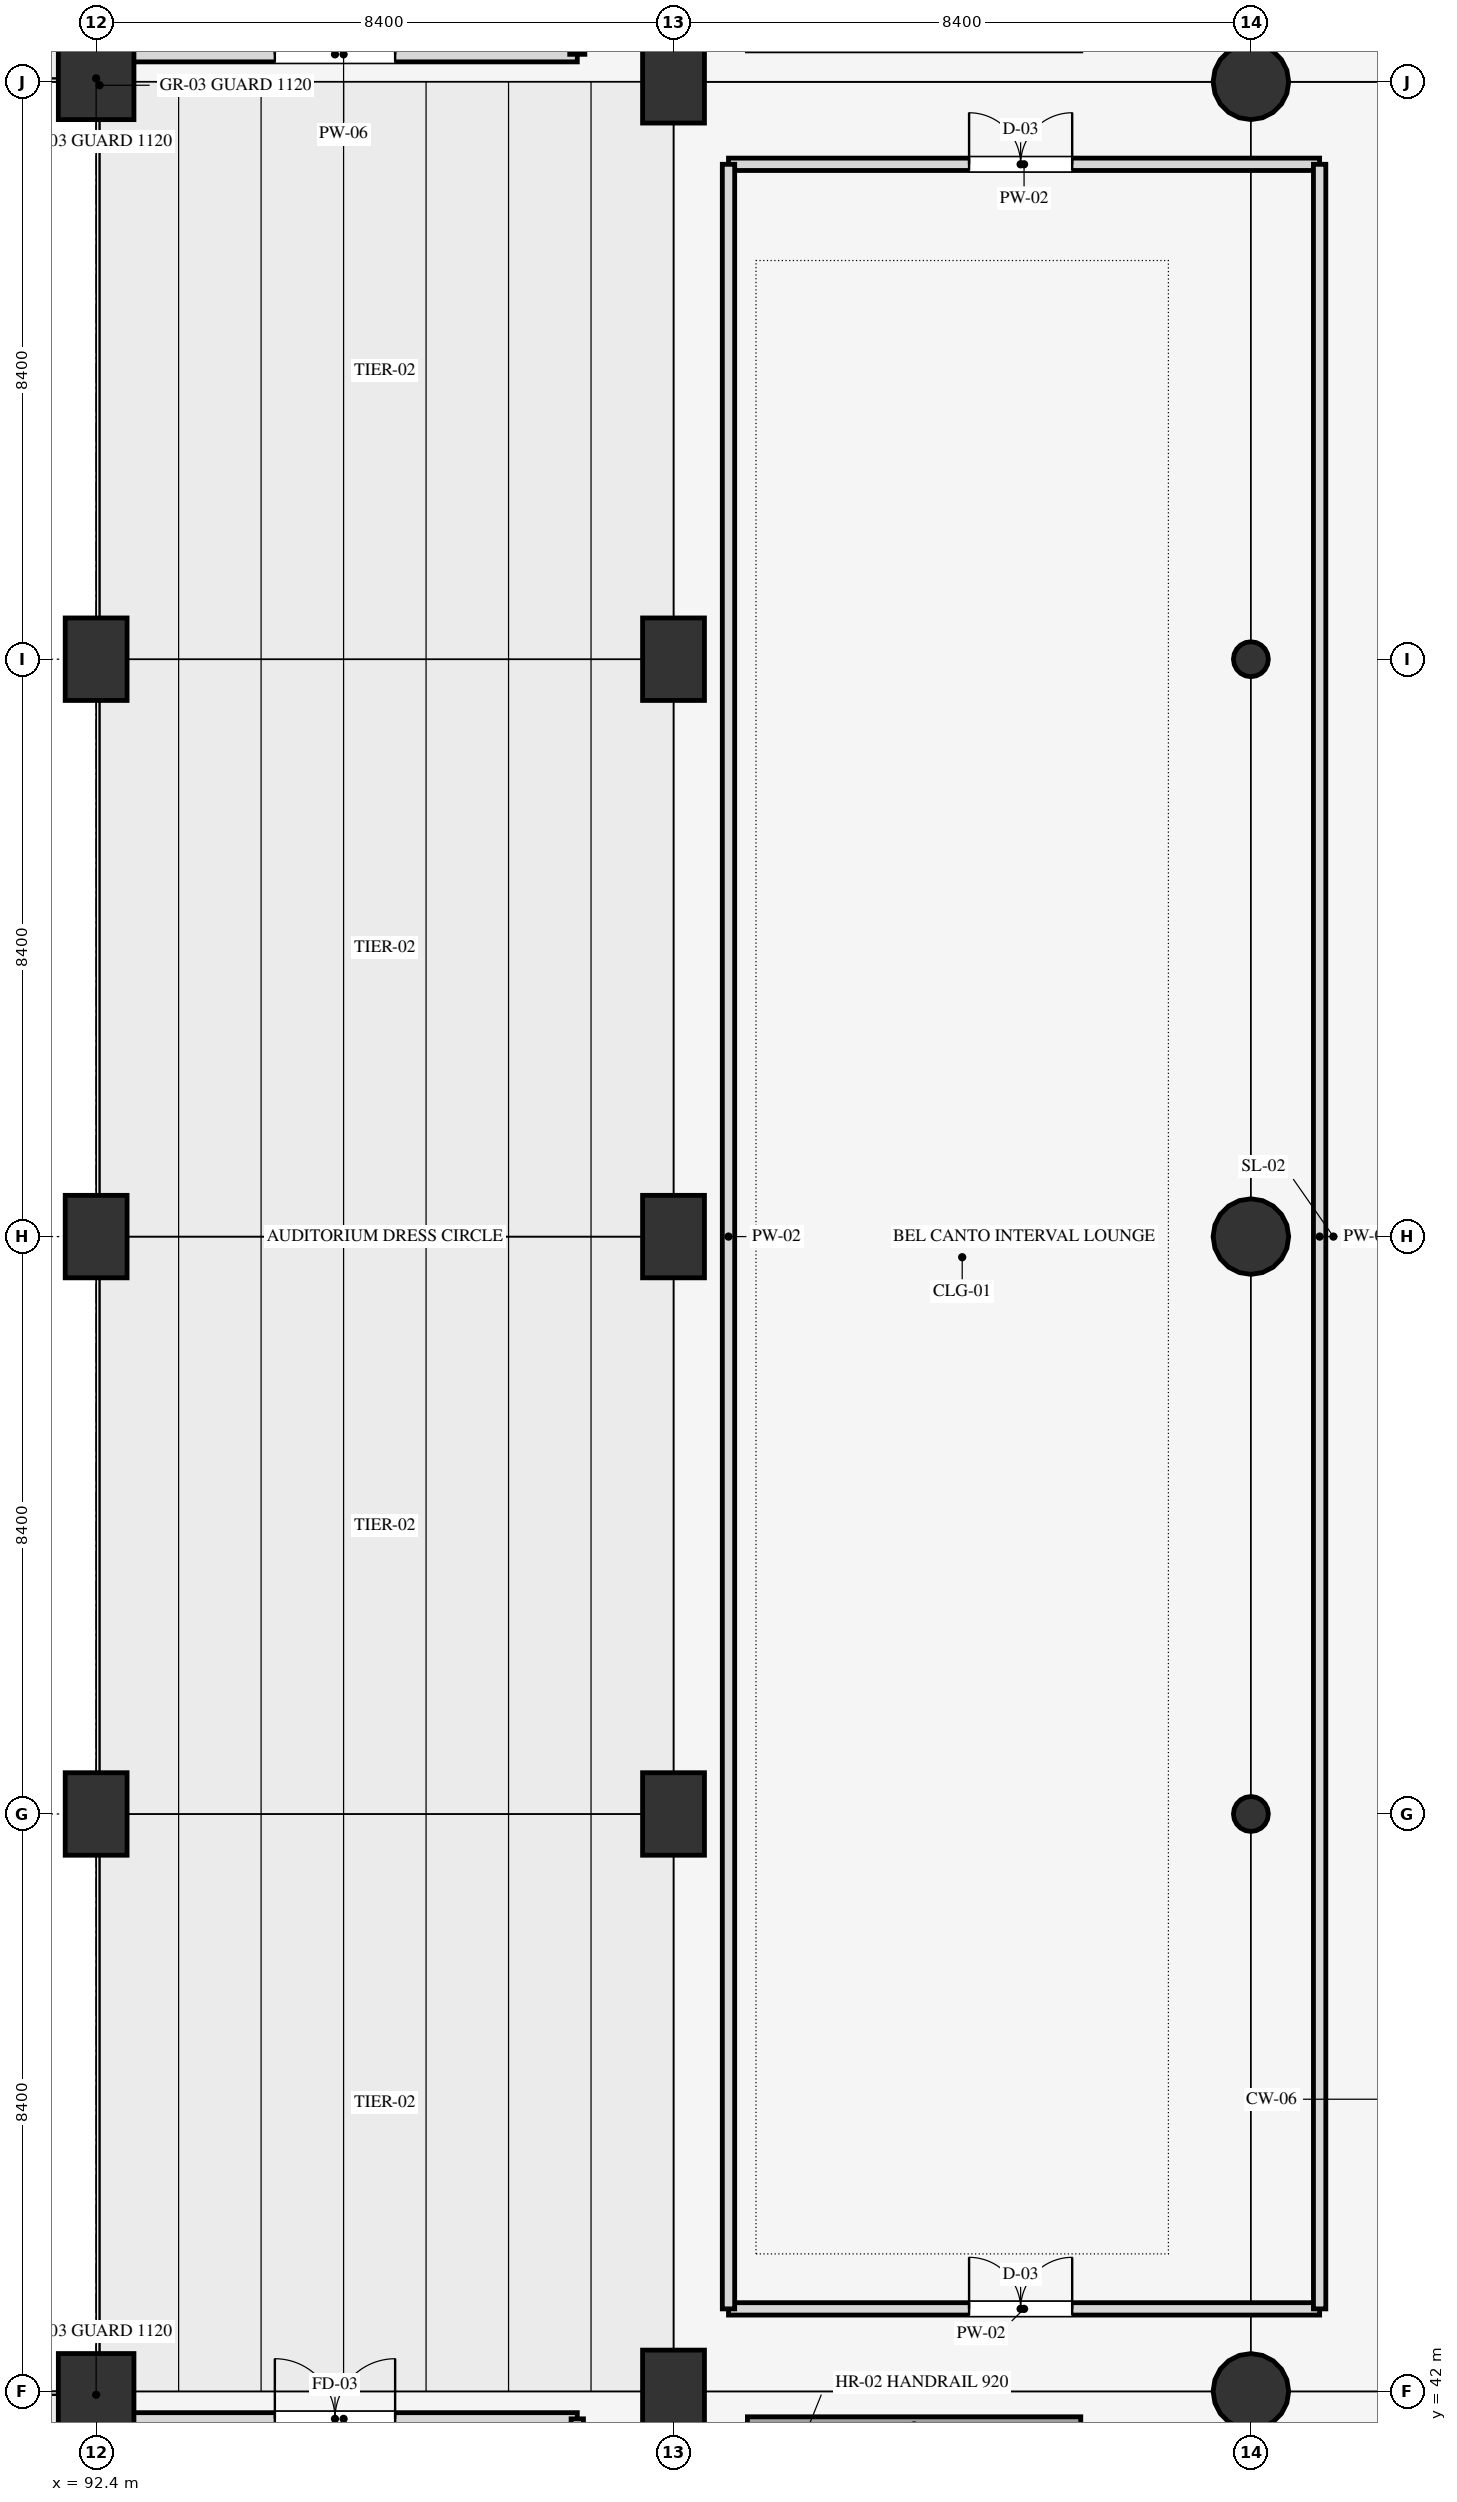
"""IFC4 building model, lengths in metres.
Left out: names, types, materials, properties, quantities, classifications, styles, units other than length and angle.
Written with IfcOpenShell. Run it as: python <this file> out.ifc"""

import sys

from ifc_helpers import new_model, si_unit, direction, frame, frame_2d, origin, origin_2d, place, context, subcontext, project, spatial, rectangle, circle, hollow_circle, extrude, element, fill, save


model = new_model("IFC4")
c1 = context("Model", 3, precision=1e-05, world=origin(), true_north=direction((0.0, 1.0)))
c2 = subcontext(c1, "Body", "Model", "MODEL_VIEW")
j1 = project(units=[si_unit("LENGTHUNIT", "METRE"), si_unit("PLANEANGLEUNIT", "RADIAN")], contexts=[c1])
p1 = place(None, origin())
s1 = spatial("IfcSite", under=j1, at=p1, CompositionType="ELEMENT")
p2 = place(p1, origin())
s2 = spatial("IfcBuilding", under=s1, at=p2, CompositionType="ELEMENT")
p3 = place(p2, frame((0.0, 0.0, 9.9)))
s3 = spatial("IfcBuildingStorey", under=s2, at=p3, CompositionType="ELEMENT", Elevation=9.9)
p4 = place(p3, frame((92.4, 42.0, 0.0), z_axis=(0.0, 0.0, 1.0), x_axis=(1.0, 0.0, 0.0)))
e1 = element("IfcColumn", 1, at=p4, inside=s3, PredefinedType="COLUMN", context=c2, shape_type="SweptSolid", body=[
    extrude(rectangle(XDim=1.1, YDim=1.1, at=origin_2d()), origin(), (0.0, 0.0, 1.0), 4.5),
])
for number, where, z_axis, x_axis in (
    (2, (92.4, 50.4, 0.0), (0.0, 0.0, 1.0), (1.0, 0.0, 0.0)),
    (3, (92.4, 58.8, 0.0), (0.0, 0.0, 1.0), (1.0, 0.0, 0.0)),
    (4, (92.4, 67.2, 0.0), (0.0, 0.0, 1.0), (1.0, 0.0, 0.0)),
):
    element("IfcColumn", number, at=place(p3, frame(where, z_axis=z_axis, x_axis=x_axis)), inside=s3, PredefinedType="COLUMN", context=c2, shape_type="SweptSolid", body=[
        extrude(rectangle(XDim=0.9, YDim=1.2, at=origin_2d()), origin(), (0.0, 0.0, 1.0), 4.5),
    ])
p5 = place(p3, frame((92.4, 75.6, 0.0), z_axis=(0.0, 0.0, 1.0), x_axis=(1.0, 0.0, 0.0)))
e5 = element("IfcColumn", 5, at=p5, inside=s3, PredefinedType="COLUMN", context=c2, shape_type="SweptSolid", body=[
    extrude(rectangle(XDim=1.1, YDim=1.1, at=origin_2d()), origin(), (0.0, 0.0, 1.0), 4.5),
])
for number, where, z_axis, x_axis in (
    (6, (100.8, 42.0, 0.0), (0.0, 0.0, 1.0), (1.0, 0.0, 0.0)),
    (7, (100.8, 50.4, 0.0), (0.0, 0.0, 1.0), (1.0, 0.0, 0.0)),
    (8, (100.8, 58.8, 0.0), (0.0, 0.0, 1.0), (1.0, 0.0, 0.0)),
    (9, (100.8, 67.2, 0.0), (0.0, 0.0, 1.0), (1.0, 0.0, 0.0)),
    (10, (100.8, 75.6, 0.0), (0.0, 0.0, 1.0), (1.0, 0.0, 0.0)),
):
    element("IfcColumn", number, at=place(p3, frame(where, z_axis=z_axis, x_axis=x_axis)), inside=s3, PredefinedType="COLUMN", context=c2, shape_type="SweptSolid", body=[
        extrude(rectangle(XDim=0.9, YDim=1.2, at=origin_2d()), origin(), (0.0, 0.0, 1.0), 4.5),
    ])
p6 = place(p3, frame((109.2, 42.0, 0.0), z_axis=(0.0, 0.0, 1.0), x_axis=(1.0, 0.0, 0.0)))
e11 = element("IfcColumn", 11, at=p6, inside=s3, PredefinedType="COLUMN", context=c2, shape_type="SweptSolid", body=[
    extrude(circle(Radius=0.55, at=origin_2d()), origin(), (0.0, 0.0, 1.0), 4.5),
])
p7 = place(p3, frame((109.2, 50.4, 0.0), z_axis=(0.0, 0.0, 1.0), x_axis=(1.0, 0.0, 0.0)))
e12 = element("IfcColumn", 12, at=p7, inside=s3, PredefinedType="COLUMN", context=c2, shape_type="SweptSolid", body=[
    extrude(hollow_circle(Radius=0.254, WallThickness=0.02, at=origin_2d()), origin(), (0.0, 0.0, 1.0), 4.5),
])
p8 = place(p3, frame((109.2, 58.8, 0.0), z_axis=(0.0, 0.0, 1.0), x_axis=(1.0, 0.0, 0.0)))
e13 = element("IfcColumn", 13, at=p8, inside=s3, PredefinedType="COLUMN", context=c2, shape_type="SweptSolid", body=[
    extrude(circle(Radius=0.55, at=origin_2d()), origin(), (0.0, 0.0, 1.0), 4.5),
])
p9 = place(p3, frame((109.2, 67.2, 0.0), z_axis=(0.0, 0.0, 1.0), x_axis=(1.0, 0.0, 0.0)))
e14 = element("IfcColumn", 14, at=p9, inside=s3, PredefinedType="COLUMN", context=c2, shape_type="SweptSolid", body=[
    extrude(hollow_circle(Radius=0.254, WallThickness=0.02, at=origin_2d()), origin(), (0.0, 0.0, 1.0), 4.5),
])
p10 = place(p3, frame((109.2, 75.6, 0.0), z_axis=(0.0, 0.0, 1.0), x_axis=(1.0, 0.0, 0.0)))
e15 = element("IfcColumn", 15, at=p10, inside=s3, PredefinedType="COLUMN", context=c2, shape_type="SweptSolid", body=[
    extrude(circle(Radius=0.55, at=origin_2d()), origin(), (0.0, 0.0, 1.0), 4.5),
])
p11 = place(p3, frame((101.875, 41.505, 0.0), z_axis=(0.0, 0.0, 1.0), x_axis=(1.0, 0.0, 0.0)))
e16 = element("IfcWall", 16, at=p11, inside=s3, PredefinedType="SHEAR", context=c2, shape_type="SweptSolid", body=[
    extrude(rectangle(XDim=4.85, YDim=0.25, at=frame_2d((2.425, 0.0))), origin(), (0.0, 0.0, 1.0), 4.5),
])
p12 = place(p3, frame((92.6, 41.6, 0.0), z_axis=(0.0, 0.0, 1.0), x_axis=(1.0, 0.0, 0.0)))
e17 = element("IfcWall", 17, at=p12, inside=s3, PredefinedType="PARTITIONING", context=c2, shape_type="SweptSolid", body=[
    extrude(rectangle(XDim=6.8, YDim=0.18, at=frame_2d((3.4, 0.0))), origin(), (0.0, 0.0, 1.0), 3.54),
])
p13 = place(p12, frame((2.4, 0.0, 0.0)))
e18 = element("IfcOpeningElement", 18, at=p13, cuts=e17, PredefinedType="OPENING", context=c2, shape_type="SweptSolid", body=[
    extrude(rectangle(XDim=1.75, YDim=2.2, at=frame_2d((0.875, 1.1))), frame((0.0, 0.1, 0.0), z_axis=(0.0, -1.0, 0.0), x_axis=(1.0, 0.0, 0.0)), (0.0, 0.0, 1.0), 0.2),
])
p14 = place(p3, frame((92.6, 34.2, 0.0), z_axis=(0.0, 0.0, 1.0), x_axis=(0.0, 1.0, 0.0)))
e19 = element("IfcWall", 19, at=p14, inside=s3, PredefinedType="PARTITIONING", context=c2, shape_type="SweptSolid", body=[
    extrude(rectangle(XDim=7.4, YDim=0.18, at=frame_2d((3.7, 0.0))), origin(), (0.0, 0.0, 1.0), 3.54),
])
p15 = place(p3, frame((99.4, 34.2, 0.0), z_axis=(0.0, 0.0, 1.0), x_axis=(0.0, 1.0, 0.0)))
e20 = element("IfcWall", 20, at=p15, inside=s3, PredefinedType="PARTITIONING", context=c2, shape_type="SweptSolid", body=[
    extrude(rectangle(XDim=7.4, YDim=0.18, at=frame_2d((3.7, 0.0))), origin(), (0.0, 0.0, 1.0), 3.54),
])
p16 = place(p15, frame((2.8, 0.0, 0.0)))
e21 = element("IfcOpeningElement", 21, at=p16, cuts=e20, PredefinedType="OPENING", context=c2, shape_type="SweptSolid", body=[
    extrude(rectangle(XDim=1.5, YDim=2.2, at=frame_2d((0.75, 1.1))), frame((0.0, 0.1, 0.0), z_axis=(0.0, -1.0, 0.0), x_axis=(1.0, 0.0, 0.0)), (0.0, 0.0, 1.0), 0.2),
])
p17 = place(p3, frame((92.6, 76.0, 0.0), z_axis=(0.0, 0.0, 1.0), x_axis=(1.0, 0.0, 0.0)))
e22 = element("IfcWall", 22, at=p17, inside=s3, PredefinedType="PARTITIONING", context=c2, shape_type="SweptSolid", body=[
    extrude(rectangle(XDim=6.8, YDim=0.22, at=frame_2d((3.4, 0.0))), origin(), (0.0, 0.0, 1.0), 3.54),
])
p18 = place(p17, frame((2.4, 0.0, 0.0)))
e23 = element("IfcOpeningElement", 23, at=p18, cuts=e22, PredefinedType="OPENING", context=c2, shape_type="SweptSolid", body=[
    extrude(rectangle(XDim=1.75, YDim=2.2, at=frame_2d((0.875, 1.1))), frame((0.0, 0.12, 0.0), z_axis=(0.0, -1.0, 0.0), x_axis=(1.0, 0.0, 0.0)), (0.0, 0.0, 1.0), 0.24),
])
p19 = place(p3, frame((92.6, 76.0, 0.0), z_axis=(0.0, 0.0, 1.0), x_axis=(0.0, 1.0, 0.0)))
e24 = element("IfcWall", 24, at=p19, inside=s3, PredefinedType="PARTITIONING", context=c2, shape_type="SweptSolid", body=[
    extrude(rectangle(XDim=7.4, YDim=0.22, at=frame_2d((3.7, 0.0))), origin(), (0.0, 0.0, 1.0), 3.54),
])
p20 = place(p3, frame((99.4, 76.0, 0.0), z_axis=(0.0, 0.0, 1.0), x_axis=(0.0, 1.0, 0.0)))
e25 = element("IfcWall", 25, at=p20, inside=s3, PredefinedType="PARTITIONING", context=c2, shape_type="SweptSolid", body=[
    extrude(rectangle(XDim=7.4, YDim=0.22, at=frame_2d((3.7, 0.0))), origin(), (0.0, 0.0, 1.0), 3.54),
])
p21 = place(p20, frame((2.8, 0.0, 0.0)))
e26 = element("IfcOpeningElement", 26, at=p21, cuts=e25, PredefinedType="OPENING", context=c2, shape_type="SweptSolid", body=[
    extrude(rectangle(XDim=1.32, YDim=2.18, at=frame_2d((0.66, 1.09))), frame((0.0, 0.12, 0.0), z_axis=(0.0, -1.0, 0.0), x_axis=(1.0, 0.0, 0.0)), (0.0, 0.0, 1.0), 0.24),
])
p22 = place(p3, frame((101.6, 43.2, 0.0), z_axis=(0.0, 0.0, 1.0), x_axis=(1.0, 0.0, 0.0)))
e27 = element("IfcWall", 27, at=p22, inside=s3, PredefinedType="PARTITIONING", context=c2, shape_type="SweptSolid", body=[
    extrude(rectangle(XDim=8.6, YDim=0.18, at=frame_2d((4.3, 0.0))), origin(), (0.0, 0.0, 1.0), 3.54),
])
p23 = place(p22, frame((3.5, 0.0, 0.0)))
e28 = element("IfcOpeningElement", 28, at=p23, cuts=e27, PredefinedType="OPENING", context=c2, shape_type="SweptSolid", body=[
    extrude(rectangle(XDim=1.5, YDim=2.2, at=frame_2d((0.75, 1.1))), frame((0.0, 0.1, 0.0), z_axis=(0.0, -1.0, 0.0), x_axis=(1.0, 0.0, 0.0)), (0.0, 0.0, 1.0), 0.2),
])
p24 = place(p3, frame((101.6, 74.4, 0.0), z_axis=(0.0, 0.0, 1.0), x_axis=(1.0, 0.0, 0.0)))
e29 = element("IfcWall", 29, at=p24, inside=s3, PredefinedType="PARTITIONING", context=c2, shape_type="SweptSolid", body=[
    extrude(rectangle(XDim=8.6, YDim=0.18, at=frame_2d((4.3, 0.0))), origin(), (0.0, 0.0, 1.0), 3.54),
])
p25 = place(p24, frame((3.5, 0.0, 0.0)))
e30 = element("IfcOpeningElement", 30, at=p25, cuts=e29, PredefinedType="OPENING", context=c2, shape_type="SweptSolid", body=[
    extrude(rectangle(XDim=1.5, YDim=2.2, at=frame_2d((0.75, 1.1))), frame((0.0, 0.1, 0.0), z_axis=(0.0, -1.0, 0.0), x_axis=(1.0, 0.0, 0.0)), (0.0, 0.0, 1.0), 0.2),
])
for number, where, z_axis, x_axis in (
    (31, (101.6, 43.2, 0.0), (0.0, 0.0, 1.0), (0.0, 1.0, 0.0)),
    (32, (110.2, 43.2, 0.0), (0.0, 0.0, 1.0), (0.0, 1.0, 0.0)),
):
    element("IfcWall", number, at=place(p3, frame(where, z_axis=z_axis, x_axis=x_axis)), inside=s3, PredefinedType="PARTITIONING", context=c2, shape_type="SweptSolid", body=[
        extrude(rectangle(XDim=31.2, YDim=0.18, at=frame_2d((15.6, 0.0))), origin(), (0.0, 0.0, 1.0), 3.54),
    ])
p26 = place(p13, origin())
e33 = element("IfcDoor", 33, at=p26, inside=s3, OperationType="DOUBLE_DOOR_SINGLE_SWING", PredefinedType="DOOR", context=c2, shape_type="SweptSolid", body=[
    extrude(rectangle(XDim=1.75, YDim=2.2, at=frame_2d((0.875, 1.1))), frame((0.0, 0.025, 0.0), z_axis=(0.0, -1.0, 0.0), x_axis=(1.0, 0.0, 0.0)), (0.0, 0.0, 1.0), 0.05),
])
fill(e18, e33)
p27 = place(p18, origin())
e34 = element("IfcDoor", 34, at=p27, inside=s3, OperationType="DOUBLE_DOOR_SINGLE_SWING", PredefinedType="DOOR", context=c2, shape_type="SweptSolid", body=[
    extrude(rectangle(XDim=1.75, YDim=2.2, at=frame_2d((0.875, 1.1))), frame((0.0, 0.025, 0.0), z_axis=(0.0, -1.0, 0.0), x_axis=(1.0, 0.0, 0.0)), (0.0, 0.0, 1.0), 0.05),
])
fill(e23, e34)
p28 = place(p23, origin())
e35 = element("IfcDoor", 35, at=p28, inside=s3, OperationType="DOUBLE_DOOR_SINGLE_SWING", PredefinedType="DOOR", context=c2, shape_type="SweptSolid", body=[
    extrude(rectangle(XDim=1.5, YDim=2.2, at=frame_2d((0.75, 1.1))), frame((0.0, 0.025, 0.0), z_axis=(0.0, -1.0, 0.0), x_axis=(1.0, 0.0, 0.0)), (0.0, 0.0, 1.0), 0.05),
])
fill(e28, e35)
p29 = place(p25, origin())
e36 = element("IfcDoor", 36, at=p29, inside=s3, OperationType="DOUBLE_DOOR_SINGLE_SWING", PredefinedType="DOOR", context=c2, shape_type="SweptSolid", body=[
    extrude(rectangle(XDim=1.5, YDim=2.2, at=frame_2d((0.75, 1.1))), frame((0.0, 0.025, 0.0), z_axis=(0.0, -1.0, 0.0), x_axis=(1.0, 0.0, 0.0)), (0.0, 0.0, 1.0), 0.05),
])
fill(e30, e36)
save(model, sys.argv[1])
